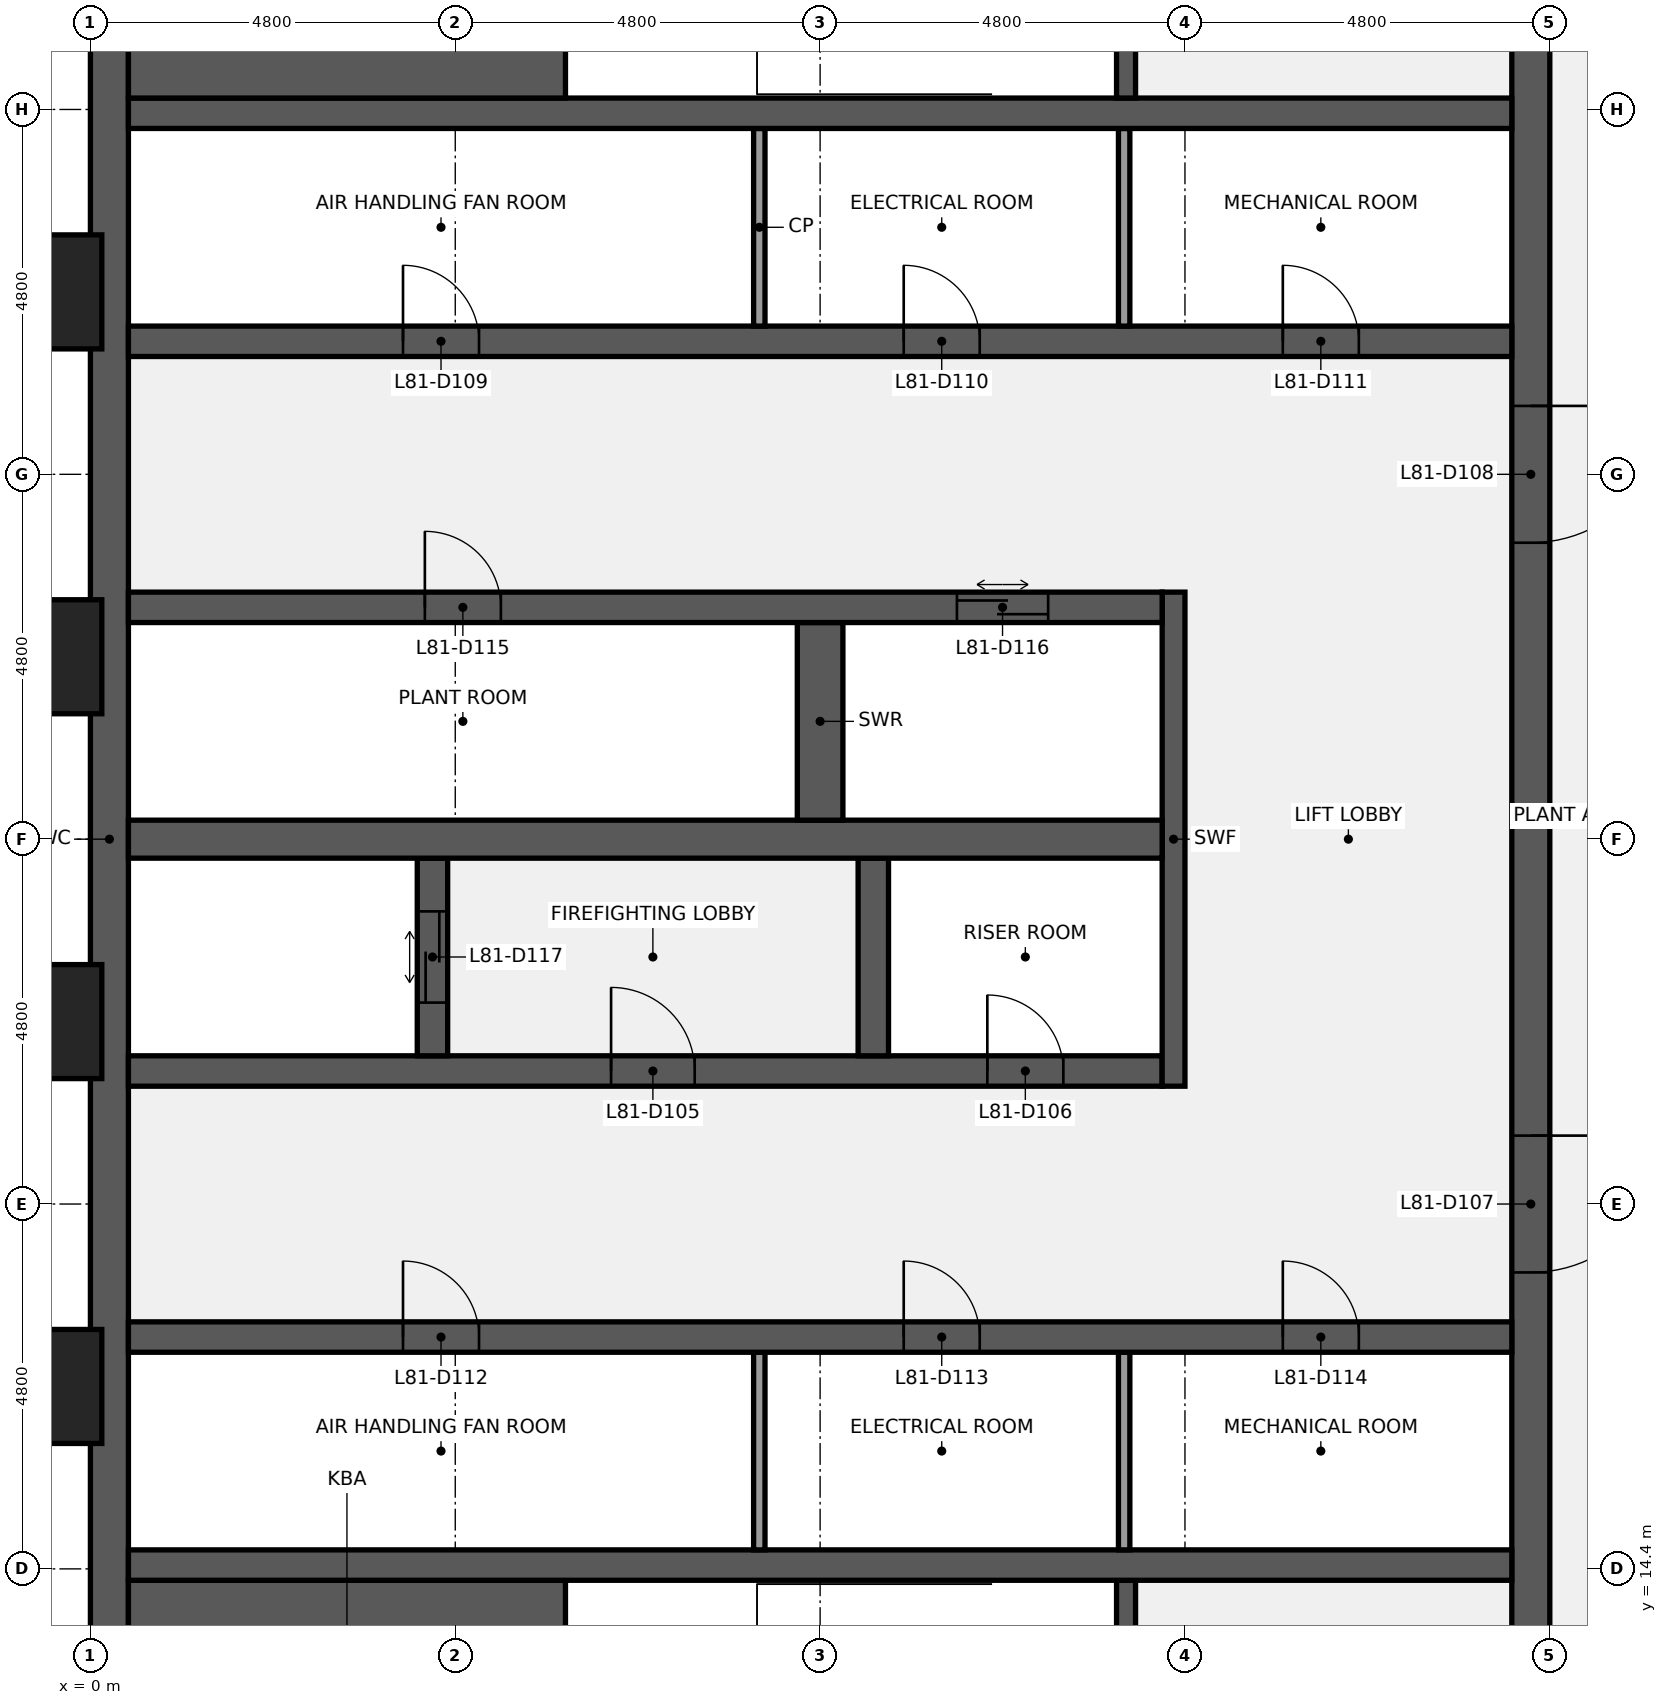
"""IFC4 building model, lengths in metres.
Left out: names, types, materials, properties, quantities, classifications, styles, units other than length and angle.
Written with IfcOpenShell. Run it as: python <this file> out.ifc"""

import sys

from ifc_helpers import new_model, si_unit, direction, frame, frame_2d, origin, origin_2d, place, context, subcontext, project, spatial, rectangle, extrude, element, fill, save


model = new_model("IFC4")
c1 = context("Model", 3, precision=1e-05, world=origin(), true_north=direction((0.0, 1.0)))
c2 = subcontext(c1, "Body", "Model", "MODEL_VIEW")
j1 = project(units=[si_unit("LENGTHUNIT", "METRE"), si_unit("PLANEANGLEUNIT", "RADIAN")], contexts=[c1])
p1 = place(None, origin())
s1 = spatial("IfcSite", under=j1, at=p1, CompositionType="ELEMENT")
p2 = place(p1, origin())
s2 = spatial("IfcBuilding", under=s1, at=p2, CompositionType="ELEMENT")
p3 = place(p2, frame((0.0, 0.0, 362.3)))
s3 = spatial("IfcBuildingStorey", under=s2, at=p3, CompositionType="ELEMENT", Elevation=362.3)
p4 = place(p3, frame((0.25, 9.6, 0.0), z_axis=(0.0, 0.0, 1.0), x_axis=(0.0, 1.0, 0.0)))
e1 = element("IfcWall", 1, at=p4, inside=s3, PredefinedType="SHEAR", context=c2, shape_type="SweptSolid", body=[
    extrude(rectangle(XDim=28.8, YDim=0.5, at=frame_2d((14.4, 0.0))), origin(), (0.0, 0.0, 1.0), 3.75),
])
p5 = place(p3, frame((18.95, 38.4, 0.0), z_axis=(0.0, 0.0, 1.0), x_axis=(0.0, -1.0, 0.0)))
e2 = element("IfcWall", 2, at=p5, inside=s3, PredefinedType="SHEAR", context=c2, shape_type="SweptSolid", body=[
    extrude(rectangle(XDim=28.8, YDim=0.5, at=frame_2d((14.4, 0.0))), origin(), (0.0, 0.0, 1.0), 3.75),
])
p6 = place(p5, frame((18.3, 0.0, 0.0)))
e3 = element("IfcOpeningElement", 3, at=p6, cuts=e2, PredefinedType="OPENING", context=c2, shape_type="SweptSolid", body=[
    extrude(rectangle(XDim=1.8, YDim=2.1, at=frame_2d((0.9, 1.05))), frame((0.0, 0.26, 0.0), z_axis=(0.0, -1.0, 0.0), x_axis=(1.0, 0.0, 0.0)), (0.0, 0.0, 1.0), 0.52),
])
p7 = place(p5, frame((8.7, 0.0, 0.0)))
e4 = element("IfcOpeningElement", 4, at=p7, cuts=e2, PredefinedType="OPENING", context=c2, shape_type="SweptSolid", body=[
    extrude(rectangle(XDim=1.8, YDim=2.1, at=frame_2d((0.9, 1.05))), frame((0.0, 0.26, 0.0), z_axis=(0.0, -1.0, 0.0), x_axis=(1.0, 0.0, 0.0)), (0.0, 0.0, 1.0), 0.52),
])
p8 = place(p3, frame((0.5, 12.175, 0.0), z_axis=(0.0, 0.0, 1.0), x_axis=(1.0, 0.0, 0.0)))
e5 = element("IfcWall", 5, at=p8, inside=s3, PredefinedType="SHEAR", context=c2, shape_type="SweptSolid", body=[
    extrude(rectangle(XDim=5.75, YDim=4.15, at=frame_2d((2.875, 0.0))), origin(), (0.0, 0.0, 1.0), 3.75),
])
p9 = place(p3, frame((13.625, 10.8, 0.0), z_axis=(0.0, 0.0, 1.0), x_axis=(0.0, 1.0, 0.0)))
e6 = element("IfcWall", 6, at=p9, inside=s3, PredefinedType="SHEAR", context=c2, shape_type="SweptSolid", body=[
    extrude(rectangle(XDim=3.45, YDim=0.25, at=frame_2d((1.725, 0.0))), origin(), (0.0, 0.0, 1.0), 3.75),
])
p10 = place(p9, frame((1.175, 0.0, 0.0)))
e7 = element("IfcOpeningElement", 7, at=p10, cuts=e6, PredefinedType="OPENING", context=c2, shape_type="SweptSolid", body=[
    extrude(rectangle(XDim=1.1, YDim=2.1, at=frame_2d((0.55, 1.05))), frame((0.0, 0.135, 0.0), z_axis=(0.0, -1.0, 0.0), x_axis=(1.0, 0.0, 0.0)), (0.0, 0.0, 1.0), 0.27),
])
p11 = place(p3, frame((0.5, 14.45, 0.0), z_axis=(0.0, 0.0, 1.0), x_axis=(1.0, 0.0, 0.0)))
e8 = element("IfcWall", 8, at=p11, inside=s3, PredefinedType="SHEAR", context=c2, shape_type="SweptSolid", body=[
    extrude(rectangle(XDim=18.2, YDim=0.4, at=frame_2d((9.1, 0.0))), origin(), (0.0, 0.0, 1.0), 3.75),
])
for number, where, z_axis, x_axis in (
    (9, (8.8, 14.65, 0.0), (0.0, 0.0, 1.0), (0.0, 1.0, 0.0)),
    (10, (13.6, 14.65, 0.0), (0.0, 0.0, 1.0), (0.0, 1.0, 0.0)),
):
    element("IfcWall", number, at=place(p3, frame(where, z_axis=z_axis, x_axis=x_axis)), inside=s3, PredefinedType="PARTITIONING", context=c2, shape_type="SweptSolid", body=[
        extrude(rectangle(XDim=2.6, YDim=0.15, at=frame_2d((1.3, 0.0))), origin(), (0.0, 0.0, 1.0), 3.75),
    ])
p12 = place(p3, frame((0.5, 17.45, 0.0), z_axis=(0.0, 0.0, 1.0), x_axis=(1.0, 0.0, 0.0)))
e11 = element("IfcWall", 11, at=p12, inside=s3, PredefinedType="SHEAR", context=c2, shape_type="SweptSolid", body=[
    extrude(rectangle(XDim=18.2, YDim=0.4, at=frame_2d((9.1, 0.0))), origin(), (0.0, 0.0, 1.0), 3.75),
])
p13 = place(p12, frame((3.613, 0.0, 0.0)))
e12 = element("IfcOpeningElement", 12, at=p13, cuts=e11, PredefinedType="OPENING", context=c2, shape_type="SweptSolid", body=[
    extrude(rectangle(XDim=1.0, YDim=2.1, at=frame_2d((0.5, 1.05))), frame((0.0, 0.21, 0.0), z_axis=(0.0, -1.0, 0.0), x_axis=(1.0, 0.0, 0.0)), (0.0, 0.0, 1.0), 0.42),
])
p14 = place(p12, frame((10.2, 0.0, 0.0)))
e13 = element("IfcOpeningElement", 13, at=p14, cuts=e11, PredefinedType="OPENING", context=c2, shape_type="SweptSolid", body=[
    extrude(rectangle(XDim=1.0, YDim=2.1, at=frame_2d((0.5, 1.05))), frame((0.0, 0.21, 0.0), z_axis=(0.0, -1.0, 0.0), x_axis=(1.0, 0.0, 0.0)), (0.0, 0.0, 1.0), 0.42),
])
p15 = place(p12, frame((15.188, 0.0, 0.0)))
e14 = element("IfcOpeningElement", 14, at=p15, cuts=e11, PredefinedType="OPENING", context=c2, shape_type="SweptSolid", body=[
    extrude(rectangle(XDim=1.0, YDim=2.1, at=frame_2d((0.5, 1.05))), frame((0.0, 0.21, 0.0), z_axis=(0.0, -1.0, 0.0), x_axis=(1.0, 0.0, 0.0)), (0.0, 0.0, 1.0), 0.42),
])
p16 = place(p3, frame((0.5, 20.95, 0.0), z_axis=(0.0, 0.0, 1.0), x_axis=(1.0, 0.0, 0.0)))
e15 = element("IfcWall", 15, at=p16, inside=s3, PredefinedType="SHEAR", context=c2, shape_type="SweptSolid", body=[
    extrude(rectangle(XDim=13.6, YDim=0.4, at=frame_2d((6.8, 0.0))), origin(), (0.0, 0.0, 1.0), 3.75),
])
p17 = place(p16, frame((6.35, 0.0, 0.0)))
e16 = element("IfcOpeningElement", 16, at=p17, cuts=e15, PredefinedType="OPENING", context=c2, shape_type="SweptSolid", body=[
    extrude(rectangle(XDim=1.1, YDim=2.1, at=frame_2d((0.55, 1.05))), frame((0.0, 0.21, 0.0), z_axis=(0.0, -1.0, 0.0), x_axis=(1.0, 0.0, 0.0)), (0.0, 0.0, 1.0), 0.42),
])
p18 = place(p16, frame((11.3, 0.0, 0.0)))
e17 = element("IfcOpeningElement", 17, at=p18, cuts=e15, PredefinedType="OPENING", context=c2, shape_type="SweptSolid", body=[
    extrude(rectangle(XDim=1.0, YDim=2.1, at=frame_2d((0.5, 1.05))), frame((0.0, 0.21, 0.0), z_axis=(0.0, -1.0, 0.0), x_axis=(1.0, 0.0, 0.0)), (0.0, 0.0, 1.0), 0.42),
])
p19 = place(p3, frame((14.25, 20.75, 0.0), z_axis=(0.0, 0.0, 1.0), x_axis=(0.0, 1.0, 0.0)))
e18 = element("IfcWall", 18, at=p19, inside=s3, PredefinedType="SHEAR", context=c2, shape_type="SweptSolid", body=[
    extrude(rectangle(XDim=6.5, YDim=0.3, at=frame_2d((3.25, 0.0))), origin(), (0.0, 0.0, 1.0), 3.75),
])
p20 = place(p3, frame((4.5, 21.15, 0.0), z_axis=(0.0, 0.0, 1.0), x_axis=(0.0, 1.0, 0.0)))
e19 = element("IfcWall", 19, at=p20, inside=s3, PredefinedType="SHEAR", context=c2, shape_type="SweptSolid", body=[
    extrude(rectangle(XDim=2.6, YDim=0.4, at=frame_2d((1.3, 0.0))), origin(), (0.0, 0.0, 1.0), 3.75),
])
p21 = place(p20, frame((0.7, 0.0, 0.0)))
e20 = element("IfcOpeningElement", 20, at=p21, cuts=e19, PredefinedType="OPENING", context=c2, shape_type="SweptSolid", body=[
    extrude(rectangle(XDim=1.2, YDim=2.1, at=frame_2d((0.6, 1.05))), frame((0.0, 0.21, 0.0), z_axis=(0.0, -1.0, 0.0), x_axis=(1.0, 0.0, 0.0)), (0.0, 0.0, 1.0), 0.42),
])
p22 = place(p3, frame((10.3, 21.15, 0.0), z_axis=(0.0, 0.0, 1.0), x_axis=(0.0, 1.0, 0.0)))
e21 = element("IfcWall", 21, at=p22, inside=s3, PredefinedType="SHEAR", context=c2, shape_type="SweptSolid", body=[
    extrude(rectangle(XDim=2.6, YDim=0.4, at=frame_2d((1.3, 0.0))), origin(), (0.0, 0.0, 1.0), 3.75),
])
p23 = place(p3, frame((0.5, 24.0, 0.0), z_axis=(0.0, 0.0, 1.0), x_axis=(1.0, 0.0, 0.0)))
e22 = element("IfcWall", 22, at=p23, inside=s3, PredefinedType="SHEAR", context=c2, shape_type="SweptSolid", body=[
    extrude(rectangle(XDim=13.6, YDim=0.5, at=frame_2d((6.8, 0.0))), origin(), (0.0, 0.0, 1.0), 3.75),
])
p24 = place(p3, frame((9.6, 24.25, 0.0), z_axis=(0.0, 0.0, 1.0), x_axis=(0.0, 1.0, 0.0)))
e23 = element("IfcWall", 23, at=p24, inside=s3, PredefinedType="SHEAR", context=c2, shape_type="SweptSolid", body=[
    extrude(rectangle(XDim=2.6, YDim=0.6, at=frame_2d((1.3, 0.0))), origin(), (0.0, 0.0, 1.0), 3.75),
])
p25 = place(p3, frame((0.5, 27.05, 0.0), z_axis=(0.0, 0.0, 1.0), x_axis=(1.0, 0.0, 0.0)))
e24 = element("IfcWall", 24, at=p25, inside=s3, PredefinedType="SHEAR", context=c2, shape_type="SweptSolid", body=[
    extrude(rectangle(XDim=13.6, YDim=0.4, at=frame_2d((6.8, 0.0))), origin(), (0.0, 0.0, 1.0), 3.75),
])
p26 = place(p25, frame((3.9, 0.0, 0.0)))
e25 = element("IfcOpeningElement", 25, at=p26, cuts=e24, PredefinedType="OPENING", context=c2, shape_type="SweptSolid", body=[
    extrude(rectangle(XDim=1.0, YDim=2.1, at=frame_2d((0.5, 1.05))), frame((0.0, 0.21, 0.0), z_axis=(0.0, -1.0, 0.0), x_axis=(1.0, 0.0, 0.0)), (0.0, 0.0, 1.0), 0.42),
])
p27 = place(p25, frame((10.9, 0.0, 0.0)))
e26 = element("IfcOpeningElement", 26, at=p27, cuts=e24, PredefinedType="OPENING", context=c2, shape_type="SweptSolid", body=[
    extrude(rectangle(XDim=1.2, YDim=2.1, at=frame_2d((0.6, 1.05))), frame((0.0, 0.21, 0.0), z_axis=(0.0, -1.0, 0.0), x_axis=(1.0, 0.0, 0.0)), (0.0, 0.0, 1.0), 0.42),
])
p28 = place(p3, frame((0.5, 30.55, 0.0), z_axis=(0.0, 0.0, 1.0), x_axis=(1.0, 0.0, 0.0)))
e27 = element("IfcWall", 27, at=p28, inside=s3, PredefinedType="SHEAR", context=c2, shape_type="SweptSolid", body=[
    extrude(rectangle(XDim=18.2, YDim=0.4, at=frame_2d((9.1, 0.0))), origin(), (0.0, 0.0, 1.0), 3.75),
])
p29 = place(p28, frame((3.613, 0.0, 0.0)))
e28 = element("IfcOpeningElement", 28, at=p29, cuts=e27, PredefinedType="OPENING", context=c2, shape_type="SweptSolid", body=[
    extrude(rectangle(XDim=1.0, YDim=2.1, at=frame_2d((0.5, 1.05))), frame((0.0, 0.21, 0.0), z_axis=(0.0, -1.0, 0.0), x_axis=(1.0, 0.0, 0.0)), (0.0, 0.0, 1.0), 0.42),
])
p30 = place(p28, frame((10.2, 0.0, 0.0)))
e29 = element("IfcOpeningElement", 29, at=p30, cuts=e27, PredefinedType="OPENING", context=c2, shape_type="SweptSolid", body=[
    extrude(rectangle(XDim=1.0, YDim=2.1, at=frame_2d((0.5, 1.05))), frame((0.0, 0.21, 0.0), z_axis=(0.0, -1.0, 0.0), x_axis=(1.0, 0.0, 0.0)), (0.0, 0.0, 1.0), 0.42),
])
p31 = place(p28, frame((15.188, 0.0, 0.0)))
e30 = element("IfcOpeningElement", 30, at=p31, cuts=e27, PredefinedType="OPENING", context=c2, shape_type="SweptSolid", body=[
    extrude(rectangle(XDim=1.0, YDim=2.1, at=frame_2d((0.5, 1.05))), frame((0.0, 0.21, 0.0), z_axis=(0.0, -1.0, 0.0), x_axis=(1.0, 0.0, 0.0)), (0.0, 0.0, 1.0), 0.42),
])
for number, where, z_axis, x_axis in (
    (31, (8.8, 30.75, 0.0), (0.0, 0.0, 1.0), (0.0, 1.0, 0.0)),
    (32, (13.6, 30.75, 0.0), (0.0, 0.0, 1.0), (0.0, 1.0, 0.0)),
):
    element("IfcWall", number, at=place(p3, frame(where, z_axis=z_axis, x_axis=x_axis)), inside=s3, PredefinedType="PARTITIONING", context=c2, shape_type="SweptSolid", body=[
        extrude(rectangle(XDim=2.6, YDim=0.15, at=frame_2d((1.3, 0.0))), origin(), (0.0, 0.0, 1.0), 3.75),
    ])
p32 = place(p3, frame((0.5, 33.55, 0.0), z_axis=(0.0, 0.0, 1.0), x_axis=(1.0, 0.0, 0.0)))
e33 = element("IfcWall", 33, at=p32, inside=s3, PredefinedType="SHEAR", context=c2, shape_type="SweptSolid", body=[
    extrude(rectangle(XDim=18.2, YDim=0.4, at=frame_2d((9.1, 0.0))), origin(), (0.0, 0.0, 1.0), 3.75),
])
p33 = place(p3, frame((0.5, 35.825, 0.0), z_axis=(0.0, 0.0, 1.0), x_axis=(1.0, 0.0, 0.0)))
e34 = element("IfcWall", 34, at=p33, inside=s3, PredefinedType="SHEAR", context=c2, shape_type="SweptSolid", body=[
    extrude(rectangle(XDim=5.75, YDim=4.15, at=frame_2d((2.875, 0.0))), origin(), (0.0, 0.0, 1.0), 3.75),
])
p34 = place(p3, frame((13.625, 33.75, 0.0), z_axis=(0.0, 0.0, 1.0), x_axis=(0.0, 1.0, 0.0)))
e35 = element("IfcWall", 35, at=p34, inside=s3, PredefinedType="SHEAR", context=c2, shape_type="SweptSolid", body=[
    extrude(rectangle(XDim=3.45, YDim=0.25, at=frame_2d((1.725, 0.0))), origin(), (0.0, 0.0, 1.0), 3.75),
])
p35 = place(p34, frame((1.175, 0.0, 0.0)))
e36 = element("IfcOpeningElement", 36, at=p35, cuts=e35, PredefinedType="OPENING", context=c2, shape_type="SweptSolid", body=[
    extrude(rectangle(XDim=1.1, YDim=2.1, at=frame_2d((0.55, 1.05))), frame((0.0, 0.135, 0.0), z_axis=(0.0, -1.0, 0.0), x_axis=(1.0, 0.0, 0.0)), (0.0, 0.0, 1.0), 0.27),
])
for number, where, z_axis, x_axis in (
    (37, (-0.75, 16.8, 0.0), (0.0, 0.0, 1.0), (0.0, 1.0, 0.0)),
    (38, (-0.75, 21.6, 0.0), (0.0, 0.0, 1.0), (0.0, 1.0, 0.0)),
    (39, (-0.75, 26.4, 0.0), (0.0, 0.0, 1.0), (0.0, 1.0, 0.0)),
    (40, (-0.75, 31.2, 0.0), (0.0, 0.0, 1.0), (0.0, 1.0, 0.0)),
):
    element("IfcColumn", number, at=place(p3, frame(where, z_axis=z_axis, x_axis=x_axis)), inside=s3, PredefinedType="PILASTER", context=c2, shape_type="SweptSolid", body=[
        extrude(rectangle(XDim=1.8, YDim=1.5, at=origin_2d()), origin(), (0.0, 0.0, 1.0), 4.0),
    ])
p36 = place(p17, origin())
e41 = element("IfcDoor", 41, at=p36, inside=s3, OperationType="SINGLE_SWING_LEFT", PredefinedType="DOOR", context=c2, shape_type="SweptSolid", body=[
    extrude(rectangle(XDim=1.1, YDim=2.1, at=frame_2d((0.55, 1.05))), frame((0.0, 0.025, 0.0), z_axis=(0.0, -1.0, 0.0), x_axis=(1.0, 0.0, 0.0)), (0.0, 0.0, 1.0), 0.05),
])
fill(e16, e41)
p37 = place(p18, origin())
e42 = element("IfcDoor", 42, at=p37, inside=s3, OperationType="SINGLE_SWING_LEFT", PredefinedType="DOOR", context=c2, shape_type="SweptSolid", body=[
    extrude(rectangle(XDim=1.0, YDim=2.1, at=frame_2d((0.5, 1.05))), frame((0.0, 0.025, 0.0), z_axis=(0.0, -1.0, 0.0), x_axis=(1.0, 0.0, 0.0)), (0.0, 0.0, 1.0), 0.05),
])
fill(e17, e42)
p38 = place(p6, origin())
e43 = element("IfcDoor", 43, at=p38, inside=s3, OperationType="DOUBLE_DOOR_SINGLE_SWING", PredefinedType="DOOR", context=c2, shape_type="SweptSolid", body=[
    extrude(rectangle(XDim=1.8, YDim=2.1, at=frame_2d((0.9, 1.05))), frame((0.0, 0.025, 0.0), z_axis=(0.0, -1.0, 0.0), x_axis=(1.0, 0.0, 0.0)), (0.0, 0.0, 1.0), 0.05),
])
fill(e3, e43)
p39 = place(p7, origin())
e44 = element("IfcDoor", 44, at=p39, inside=s3, OperationType="DOUBLE_DOOR_SINGLE_SWING", PredefinedType="DOOR", context=c2, shape_type="SweptSolid", body=[
    extrude(rectangle(XDim=1.8, YDim=2.1, at=frame_2d((0.9, 1.05))), frame((0.0, 0.025, 0.0), z_axis=(0.0, -1.0, 0.0), x_axis=(1.0, 0.0, 0.0)), (0.0, 0.0, 1.0), 0.05),
])
fill(e4, e44)
p40 = place(p29, origin())
e45 = element("IfcDoor", 45, at=p40, inside=s3, OperationType="SINGLE_SWING_LEFT", PredefinedType="DOOR", context=c2, shape_type="SweptSolid", body=[
    extrude(rectangle(XDim=1.0, YDim=2.1, at=frame_2d((0.5, 1.05))), frame((0.0, 0.025, 0.0), z_axis=(0.0, -1.0, 0.0), x_axis=(1.0, 0.0, 0.0)), (0.0, 0.0, 1.0), 0.05),
])
fill(e28, e45)
p41 = place(p30, origin())
e46 = element("IfcDoor", 46, at=p41, inside=s3, OperationType="SINGLE_SWING_LEFT", PredefinedType="DOOR", context=c2, shape_type="SweptSolid", body=[
    extrude(rectangle(XDim=1.0, YDim=2.1, at=frame_2d((0.5, 1.05))), frame((0.0, 0.025, 0.0), z_axis=(0.0, -1.0, 0.0), x_axis=(1.0, 0.0, 0.0)), (0.0, 0.0, 1.0), 0.05),
])
fill(e29, e46)
p42 = place(p31, origin())
e47 = element("IfcDoor", 47, at=p42, inside=s3, OperationType="SINGLE_SWING_LEFT", PredefinedType="DOOR", context=c2, shape_type="SweptSolid", body=[
    extrude(rectangle(XDim=1.0, YDim=2.1, at=frame_2d((0.5, 1.05))), frame((0.0, 0.025, 0.0), z_axis=(0.0, -1.0, 0.0), x_axis=(1.0, 0.0, 0.0)), (0.0, 0.0, 1.0), 0.05),
])
fill(e30, e47)
p43 = place(p13, origin())
e48 = element("IfcDoor", 48, at=p43, inside=s3, OperationType="SINGLE_SWING_LEFT", PredefinedType="DOOR", context=c2, shape_type="SweptSolid", body=[
    extrude(rectangle(XDim=1.0, YDim=2.1, at=frame_2d((0.5, 1.05))), frame((0.0, 0.025, 0.0), z_axis=(0.0, -1.0, 0.0), x_axis=(1.0, 0.0, 0.0)), (0.0, 0.0, 1.0), 0.05),
])
fill(e12, e48)
p44 = place(p14, origin())
e49 = element("IfcDoor", 49, at=p44, inside=s3, OperationType="SINGLE_SWING_LEFT", PredefinedType="DOOR", context=c2, shape_type="SweptSolid", body=[
    extrude(rectangle(XDim=1.0, YDim=2.1, at=frame_2d((0.5, 1.05))), frame((0.0, 0.025, 0.0), z_axis=(0.0, -1.0, 0.0), x_axis=(1.0, 0.0, 0.0)), (0.0, 0.0, 1.0), 0.05),
])
fill(e13, e49)
p45 = place(p15, origin())
e50 = element("IfcDoor", 50, at=p45, inside=s3, OperationType="SINGLE_SWING_LEFT", PredefinedType="DOOR", context=c2, shape_type="SweptSolid", body=[
    extrude(rectangle(XDim=1.0, YDim=2.1, at=frame_2d((0.5, 1.05))), frame((0.0, 0.025, 0.0), z_axis=(0.0, -1.0, 0.0), x_axis=(1.0, 0.0, 0.0)), (0.0, 0.0, 1.0), 0.05),
])
fill(e14, e50)
p46 = place(p26, origin())
e51 = element("IfcDoor", 51, at=p46, inside=s3, OperationType="SINGLE_SWING_LEFT", PredefinedType="DOOR", context=c2, shape_type="SweptSolid", body=[
    extrude(rectangle(XDim=1.0, YDim=2.1, at=frame_2d((0.5, 1.05))), frame((0.0, 0.025, 0.0), z_axis=(0.0, -1.0, 0.0), x_axis=(1.0, 0.0, 0.0)), (0.0, 0.0, 1.0), 0.05),
])
fill(e25, e51)
p47 = place(p27, origin())
e52 = element("IfcDoor", 52, at=p47, inside=s3, OperationType="DOUBLE_DOOR_SLIDING", PredefinedType="DOOR", context=c2, shape_type="SweptSolid", body=[
    extrude(rectangle(XDim=1.2, YDim=2.1, at=frame_2d((0.6, 1.05))), frame((0.0, 0.025, 0.0), z_axis=(0.0, -1.0, 0.0), x_axis=(1.0, 0.0, 0.0)), (0.0, 0.0, 1.0), 0.05),
])
fill(e26, e52)
p48 = place(p21, origin())
e53 = element("IfcDoor", 53, at=p48, inside=s3, OperationType="DOUBLE_DOOR_SLIDING", PredefinedType="DOOR", context=c2, shape_type="SweptSolid", body=[
    extrude(rectangle(XDim=1.2, YDim=2.1, at=frame_2d((0.6, 1.05))), frame((0.0, 0.025, 0.0), z_axis=(0.0, -1.0, 0.0), x_axis=(1.0, 0.0, 0.0)), (0.0, 0.0, 1.0), 0.05),
])
fill(e20, e53)
save(model, sys.argv[1])
